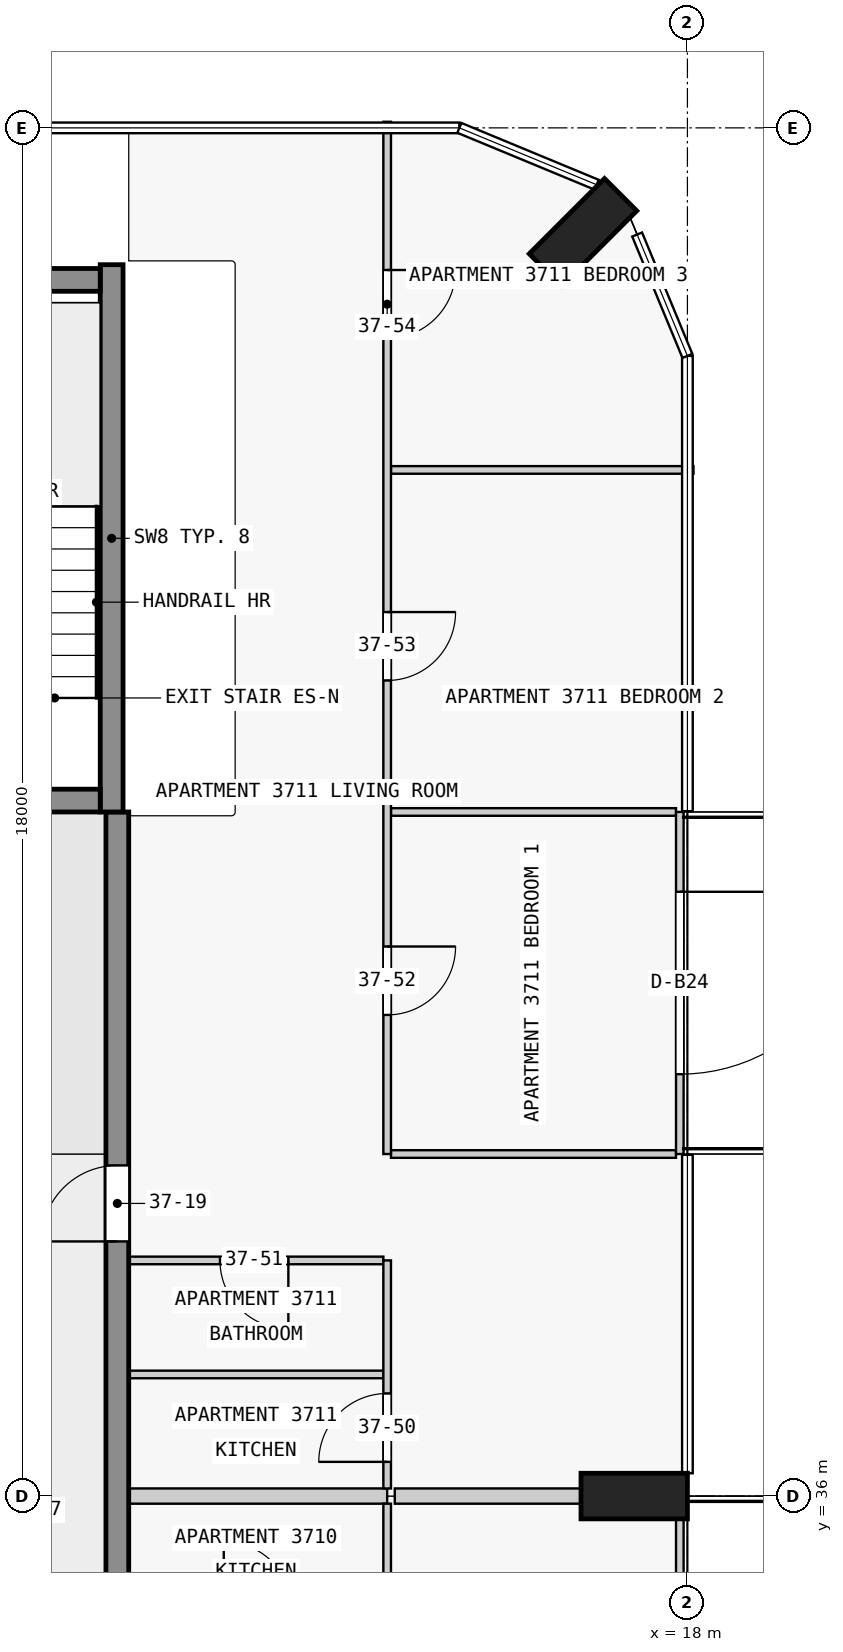
"""IFC4 building model, lengths in metres.
Left out: names, types, materials, properties, quantities, classifications, styles, units other than length and angle.
Written with IfcOpenShell. Run it as: python <this file> out.ifc"""

import sys

from ifc_helpers import new_model, si_unit, direction, frame, frame_2d, origin, origin_2d, place, context, subcontext, project, spatial, rectangle, extrude, element, fill, save


model = new_model("IFC4")
c1 = context("Model", 3, precision=1e-05, world=origin(), true_north=direction((0.0, 1.0)))
c2 = subcontext(c1, "Body", "Model", "MODEL_VIEW")
j1 = project(units=[si_unit("LENGTHUNIT", "METRE"), si_unit("PLANEANGLEUNIT", "RADIAN")], contexts=[c1])
p1 = place(None, origin())
s1 = spatial("IfcSite", under=j1, at=p1, CompositionType="ELEMENT")
p2 = place(p1, origin())
s2 = spatial("IfcBuilding", under=s1, at=p2, CompositionType="ELEMENT")
p3 = place(p2, frame((0.0, 0.0, 146.4)))
s3 = spatial("IfcBuildingStorey", under=s2, at=p3, CompositionType="ELEMENT", Elevation=146.4)
for number, where, z_axis, x_axis in (
    (1, (17.3, 36.0, 0.0), (0.0, 0.0, 1.0), (0.0, 1.0, 0.0)),
    (2, (16.626, 52.626, 0.0), (0.0, 0.0, 1.0), (-0.707, 0.707, 0.0)),
):
    element("IfcColumn", number, at=place(p3, frame(where, z_axis=z_axis, x_axis=x_axis)), inside=s3, PredefinedType="COLUMN", context=c2, shape_type="SweptSolid", body=[
        extrude(rectangle(XDim=0.6, YDim=1.4, at=origin_2d()), origin(), (0.0, 0.0, 1.0), 3.5),
    ])
p4 = place(p3, frame((7.725, 45.15, 0.0), z_axis=(0.0, 0.0, 1.0), x_axis=(1.0, 0.0, 0.0)))
e3 = element("IfcWall", 3, at=p4, inside=s3, PredefinedType="SHEAR", context=c2, shape_type="SweptSolid", body=[
    extrude(rectangle(XDim=2.55, YDim=0.3, at=frame_2d((1.275, 0.0))), origin(), (0.0, 0.0, 1.0), 3.5),
])
p5 = place(p4, frame((0.725, 0.0, 0.0)))
e4 = element("IfcOpeningElement", 4, at=p5, cuts=e3, PredefinedType="OPENING", context=c2, shape_type="SweptSolid", body=[
    extrude(rectangle(XDim=1.1, YDim=2.1, at=frame_2d((0.55, 1.05))), frame((0.0, 0.16, 0.0), z_axis=(0.0, -1.0, 0.0), x_axis=(1.0, 0.0, 0.0)), (0.0, 0.0, 1.0), 0.32),
])
p6 = place(p3, frame((7.725, 52.0, 0.0), z_axis=(0.0, 0.0, 1.0), x_axis=(1.0, 0.0, 0.0)))
e5 = element("IfcWall", 5, at=p6, inside=s3, PredefinedType="SHEAR", context=c2, shape_type="SweptSolid", body=[
    extrude(rectangle(XDim=2.55, YDim=0.3, at=frame_2d((1.275, 0.0))), origin(), (0.0, 0.0, 1.0), 3.5),
])
p7 = place(p3, frame((10.425, 45.0, 0.0), z_axis=(0.0, 0.0, 1.0), x_axis=(0.0, 1.0, 0.0)))
e6 = element("IfcWall", 6, at=p7, inside=s3, PredefinedType="SHEAR", context=c2, shape_type="SweptSolid", body=[
    extrude(rectangle(XDim=7.2, YDim=0.3, at=frame_2d((3.6, 0.0))), origin(), (0.0, 0.0, 1.0), 3.5),
])
p8 = place(p3, frame((10.5, 18.0, 0.0), z_axis=(0.0, 0.0, 1.0), x_axis=(0.0, 1.0, 0.0)))
e7 = element("IfcWall", 7, at=p8, inside=s3, PredefinedType="SHEAR", context=c2, shape_type="SweptSolid", body=[
    extrude(rectangle(XDim=27.0, YDim=0.3, at=frame_2d((13.5, 0.0))), origin(), (0.0, 0.0, 1.0), 3.25),
])
p9 = place(p8, frame((1.75, 0.0, 0.0)))
e8 = element("IfcOpeningElement", 8, at=p9, cuts=e7, PredefinedType="OPENING", context=c2, shape_type="SweptSolid", body=[
    extrude(rectangle(XDim=1.0, YDim=2.1, at=frame_2d((0.5, 1.05))), frame((0.0, 0.16, 0.0), z_axis=(0.0, -1.0, 0.0), x_axis=(1.0, 0.0, 0.0)), (0.0, 0.0, 1.0), 0.32),
])
p10 = place(p8, frame((6.25, 0.0, 0.0)))
e9 = element("IfcOpeningElement", 9, at=p10, cuts=e7, PredefinedType="OPENING", context=c2, shape_type="SweptSolid", body=[
    extrude(rectangle(XDim=1.0, YDim=2.1, at=frame_2d((0.5, 1.05))), frame((0.0, 0.16, 0.0), z_axis=(0.0, -1.0, 0.0), x_axis=(1.0, 0.0, 0.0)), (0.0, 0.0, 1.0), 0.32),
])
p11 = place(p8, frame((10.35, 0.0, 0.0)))
e10 = element("IfcOpeningElement", 10, at=p11, cuts=e7, PredefinedType="OPENING", context=c2, shape_type="SweptSolid", body=[
    extrude(rectangle(XDim=1.8, YDim=2.1, at=frame_2d((0.9, 1.05))), frame((0.0, 0.16, 0.0), z_axis=(0.0, -1.0, 0.0), x_axis=(1.0, 0.0, 0.0)), (0.0, 0.0, 1.0), 0.32),
])
p12 = place(p8, frame((15.25, 0.0, 0.0)))
e11 = element("IfcOpeningElement", 11, at=p12, cuts=e7, PredefinedType="OPENING", context=c2, shape_type="SweptSolid", body=[
    extrude(rectangle(XDim=1.0, YDim=2.1, at=frame_2d((0.5, 1.05))), frame((0.0, 0.16, 0.0), z_axis=(0.0, -1.0, 0.0), x_axis=(1.0, 0.0, 0.0)), (0.0, 0.0, 1.0), 0.32),
])
p13 = place(p8, frame((21.35, 0.0, 0.0)))
e12 = element("IfcOpeningElement", 12, at=p13, cuts=e7, PredefinedType="OPENING", context=c2, shape_type="SweptSolid", body=[
    extrude(rectangle(XDim=1.0, YDim=2.1, at=frame_2d((0.5, 1.05))), frame((0.0, 0.16, 0.0), z_axis=(0.0, -1.0, 0.0), x_axis=(1.0, 0.0, 0.0)), (0.0, 0.0, 1.0), 0.32),
])
p14 = place(p3, frame((17.9, 36.0, 0.0), z_axis=(0.0, 0.0, 1.0), x_axis=(0.0, -1.0, 0.0)))
e13 = element("IfcWall", 13, at=p14, inside=s3, PredefinedType="STANDARD", context=c2, shape_type="SweptSolid", body=[
    extrude(rectangle(XDim=4.5, YDim=0.1, at=frame_2d((2.25, 0.0))), origin(), (0.0, 0.0, 1.0), 3.25),
])
p15 = place(p14, frame((1.05, 0.0, 0.0)))
e14 = element("IfcOpeningElement", 14, at=p15, cuts=e13, PredefinedType="OPENING", context=c2, shape_type="SweptSolid", body=[
    extrude(rectangle(XDim=2.4, YDim=2.4, at=frame_2d((1.2, 1.2))), frame((0.0, 0.06, 0.0), z_axis=(0.0, -1.0, 0.0), x_axis=(1.0, 0.0, 0.0)), (0.0, 0.0, 1.0), 0.12),
])
p16 = place(p3, frame((17.9, 45.0, 0.0), z_axis=(0.0, 0.0, 1.0), x_axis=(0.0, -1.0, 0.0)))
e15 = element("IfcWall", 15, at=p16, inside=s3, PredefinedType="STANDARD", context=c2, shape_type="SweptSolid", body=[
    extrude(rectangle(XDim=4.5, YDim=0.1, at=frame_2d((2.25, 0.0))), origin(), (0.0, 0.0, 1.0), 3.25),
])
p17 = place(p16, frame((1.05, 0.0, 0.0)))
e16 = element("IfcOpeningElement", 16, at=p17, cuts=e15, PredefinedType="OPENING", context=c2, shape_type="SweptSolid", body=[
    extrude(rectangle(XDim=2.4, YDim=2.4, at=frame_2d((1.2, 1.2))), frame((0.0, 0.06, 0.0), z_axis=(0.0, -1.0, 0.0), x_axis=(1.0, 0.0, 0.0)), (0.0, 0.0, 1.0), 0.12),
])
p18 = place(p3, frame((14.05, 36.0, 0.0), z_axis=(0.0, 0.0, 1.0), x_axis=(-1.0, 0.0, 0.0)))
e17 = element("IfcWall", 17, at=p18, inside=s3, PredefinedType="PARTITIONING", context=c2, shape_type="SweptSolid", body=[
    extrude(rectangle(XDim=3.4, YDim=0.2, at=frame_2d((1.7, 0.0))), origin(), (0.0, 0.0, 1.0), 3.25),
])
p19 = place(p3, frame((14.15, 36.0, 0.0), z_axis=(0.0, 0.0, 1.0), x_axis=(1.0, 0.0, 0.0)))
e18 = element("IfcWall", 18, at=p19, inside=s3, PredefinedType="PARTITIONING", context=c2, shape_type="SweptSolid", body=[
    extrude(rectangle(XDim=2.45, YDim=0.2, at=frame_2d((1.225, 0.0))), origin(), (0.0, 0.0, 1.0), 3.25),
])
p20 = place(p3, frame((14.0, 37.6, 0.0), z_axis=(0.0, 0.0, 1.0), x_axis=(-1.0, 0.0, 0.0)))
e19 = element("IfcWall", 19, at=p20, inside=s3, PredefinedType="PARTITIONING", context=c2, shape_type="SweptSolid", body=[
    extrude(rectangle(XDim=3.35, YDim=0.1, at=frame_2d((1.675, 0.0))), origin(), (0.0, 0.0, 1.0), 3.25),
])
p21 = place(p3, frame((14.0, 39.1, 0.0), z_axis=(0.0, 0.0, 1.0), x_axis=(-1.0, 0.0, 0.0)))
e20 = element("IfcWall", 20, at=p21, inside=s3, PredefinedType="PARTITIONING", context=c2, shape_type="SweptSolid", body=[
    extrude(rectangle(XDim=3.35, YDim=0.1, at=frame_2d((1.675, 0.0))), origin(), (0.0, 0.0, 1.0), 3.25),
])
p22 = place(p21, frame((1.25, 0.0, 0.0)))
e21 = element("IfcOpeningElement", 21, at=p22, cuts=e20, PredefinedType="OPENING", context=c2, shape_type="SweptSolid", body=[
    extrude(rectangle(XDim=0.9, YDim=2.1, at=frame_2d((0.45, 1.05))), frame((0.0, 0.06, 0.0), z_axis=(0.0, -1.0, 0.0), x_axis=(1.0, 0.0, 0.0)), (0.0, 0.0, 1.0), 0.12),
])
for number, where, z_axis, x_axis in (
    (22, (14.1, 40.5, 0.0), (0.0, 0.0, 1.0), (1.0, 0.0, 0.0)),
    (23, (17.85, 45.0, 0.0), (0.0, 0.0, 1.0), (-1.0, 0.0, 0.0)),
):
    element("IfcWall", number, at=place(p3, frame(where, z_axis=z_axis, x_axis=x_axis)), inside=s3, PredefinedType="PARTITIONING", context=c2, shape_type="SweptSolid", body=[
        extrude(rectangle(XDim=3.75, YDim=0.1, at=frame_2d((1.875, 0.0))), origin(), (0.0, 0.0, 1.0), 3.25),
    ])
p23 = place(p3, frame((18.08, 49.5, 0.0), z_axis=(0.0, 0.0, 1.0), x_axis=(-1.0, 0.0, 0.0)))
e24 = element("IfcWall", 24, at=p23, inside=s3, PredefinedType="PARTITIONING", context=c2, shape_type="SweptSolid", body=[
    extrude(rectangle(XDim=3.98, YDim=0.1, at=frame_2d((1.99, 0.0))), origin(), (0.0, 0.0, 1.0), 3.25),
])
p24 = place(p3, frame((14.05, 54.08, 0.0), z_axis=(0.0, 0.0, 1.0), x_axis=(0.0, -1.0, 0.0)))
e25 = element("IfcWall", 25, at=p24, inside=s3, PredefinedType="PARTITIONING", context=c2, shape_type="SweptSolid", body=[
    extrude(rectangle(XDim=13.58, YDim=0.1, at=frame_2d((6.79, 0.0))), origin(), (0.0, 0.0, 1.0), 3.25),
])
p25 = place(p24, frame((10.85, 0.0, 0.0)))
e26 = element("IfcOpeningElement", 26, at=p25, cuts=e25, PredefinedType="OPENING", context=c2, shape_type="SweptSolid", body=[
    extrude(rectangle(XDim=0.9, YDim=2.1, at=frame_2d((0.45, 1.05))), frame((0.0, 0.06, 0.0), z_axis=(0.0, -1.0, 0.0), x_axis=(1.0, 0.0, 0.0)), (0.0, 0.0, 1.0), 0.12),
])
p26 = place(p24, frame((6.45, 0.0, 0.0)))
e27 = element("IfcOpeningElement", 27, at=p26, cuts=e25, PredefinedType="OPENING", context=c2, shape_type="SweptSolid", body=[
    extrude(rectangle(XDim=0.9, YDim=2.1, at=frame_2d((0.45, 1.05))), frame((0.0, 0.06, 0.0), z_axis=(0.0, -1.0, 0.0), x_axis=(1.0, 0.0, 0.0)), (0.0, 0.0, 1.0), 0.12),
])
p27 = place(p24, frame((1.95, 0.0, 0.0)))
e28 = element("IfcOpeningElement", 28, at=p27, cuts=e25, PredefinedType="OPENING", context=c2, shape_type="SweptSolid", body=[
    extrude(rectangle(XDim=0.9, YDim=2.1, at=frame_2d((0.45, 1.05))), frame((0.0, 0.06, 0.0), z_axis=(0.0, -1.0, 0.0), x_axis=(1.0, 0.0, 0.0)), (0.0, 0.0, 1.0), 0.12),
])
p28 = place(p3, frame((14.05, 34.5, 0.0), z_axis=(0.0, 0.0, 1.0), x_axis=(0.0, 1.0, 0.0)))
e29 = element("IfcWall", 29, at=p28, inside=s3, PredefinedType="PARTITIONING", context=c2, shape_type="SweptSolid", body=[
    extrude(rectangle(XDim=1.4, YDim=0.1, at=frame_2d((0.7, 0.0))), origin(), (0.0, 0.0, 1.0), 3.25),
])
p29 = place(p3, frame((14.05, 36.1, 0.0), z_axis=(0.0, 0.0, 1.0), x_axis=(0.0, 1.0, 0.0)))
e30 = element("IfcWall", 30, at=p29, inside=s3, PredefinedType="PARTITIONING", context=c2, shape_type="SweptSolid", body=[
    extrude(rectangle(XDim=3.0, YDim=0.1, at=frame_2d((1.5, 0.0))), origin(), (0.0, 0.0, 1.0), 3.25),
])
p30 = place(p29, frame((0.35, 0.0, 0.0)))
e31 = element("IfcOpeningElement", 31, at=p30, cuts=e30, PredefinedType="OPENING", context=c2, shape_type="SweptSolid", body=[
    extrude(rectangle(XDim=0.9, YDim=2.1, at=frame_2d((0.45, 1.05))), frame((0.0, 0.06, 0.0), z_axis=(0.0, -1.0, 0.0), x_axis=(1.0, 0.0, 0.0)), (0.0, 0.0, 1.0), 0.12),
])
p31 = place(p17, origin())
e32 = element("IfcDoor", 32, at=p31, inside=s3, OperationType="SINGLE_SWING_LEFT", PredefinedType="DOOR", context=c2, shape_type="SweptSolid", body=[
    extrude(rectangle(XDim=2.4, YDim=2.4, at=frame_2d((1.2, 1.2))), frame((0.0, 0.025, 0.0), z_axis=(0.0, -1.0, 0.0), x_axis=(1.0, 0.0, 0.0)), (0.0, 0.0, 1.0), 0.05),
])
fill(e16, e32)
p32 = place(p13, origin())
e33 = element("IfcDoor", 33, at=p32, inside=s3, OperationType="SINGLE_SWING_RIGHT", PredefinedType="DOOR", context=c2, shape_type="SweptSolid", body=[
    extrude(rectangle(XDim=1.0, YDim=2.1, at=frame_2d((0.5, 1.05))), frame((0.0, 0.025, 0.0), z_axis=(0.0, -1.0, 0.0), x_axis=(1.0, 0.0, 0.0)), (0.0, 0.0, 1.0), 0.05),
])
fill(e12, e33)
p33 = place(p30, origin())
e34 = element("IfcDoor", 34, at=p33, inside=s3, OperationType="SINGLE_SWING_LEFT", PredefinedType="DOOR", context=c2, shape_type="SweptSolid", body=[
    extrude(rectangle(XDim=0.9, YDim=2.1, at=frame_2d((0.45, 1.05))), frame((0.0, 0.025, 0.0), z_axis=(0.0, -1.0, 0.0), x_axis=(1.0, 0.0, 0.0)), (0.0, 0.0, 1.0), 0.05),
])
fill(e31, e34)
p34 = place(p22, origin())
e35 = element("IfcDoor", 35, at=p34, inside=s3, OperationType="SINGLE_SWING_RIGHT", PredefinedType="DOOR", context=c2, shape_type="SweptSolid", body=[
    extrude(rectangle(XDim=0.9, YDim=2.1, at=frame_2d((0.45, 1.05))), frame((0.0, 0.025, 0.0), z_axis=(0.0, -1.0, 0.0), x_axis=(1.0, 0.0, 0.0)), (0.0, 0.0, 1.0), 0.05),
])
fill(e21, e35)
p35 = place(p25, origin())
e36 = element("IfcDoor", 36, at=p35, inside=s3, OperationType="SINGLE_SWING_RIGHT", PredefinedType="DOOR", context=c2, shape_type="SweptSolid", body=[
    extrude(rectangle(XDim=0.9, YDim=2.1, at=frame_2d((0.45, 1.05))), frame((0.0, 0.025, 0.0), z_axis=(0.0, -1.0, 0.0), x_axis=(1.0, 0.0, 0.0)), (0.0, 0.0, 1.0), 0.05),
])
fill(e26, e36)
p36 = place(p26, origin())
e37 = element("IfcDoor", 37, at=p36, inside=s3, OperationType="SINGLE_SWING_RIGHT", PredefinedType="DOOR", context=c2, shape_type="SweptSolid", body=[
    extrude(rectangle(XDim=0.9, YDim=2.1, at=frame_2d((0.45, 1.05))), frame((0.0, 0.025, 0.0), z_axis=(0.0, -1.0, 0.0), x_axis=(1.0, 0.0, 0.0)), (0.0, 0.0, 1.0), 0.05),
])
fill(e27, e37)
p37 = place(p27, origin())
e38 = element("IfcDoor", 38, at=p37, inside=s3, OperationType="SINGLE_SWING_LEFT", PredefinedType="DOOR", context=c2, shape_type="SweptSolid", body=[
    extrude(rectangle(XDim=0.9, YDim=2.1, at=frame_2d((0.45, 1.05))), frame((0.0, 0.025, 0.0), z_axis=(0.0, -1.0, 0.0), x_axis=(1.0, 0.0, 0.0)), (0.0, 0.0, 1.0), 0.05),
])
fill(e28, e38)
save(model, sys.argv[1])
